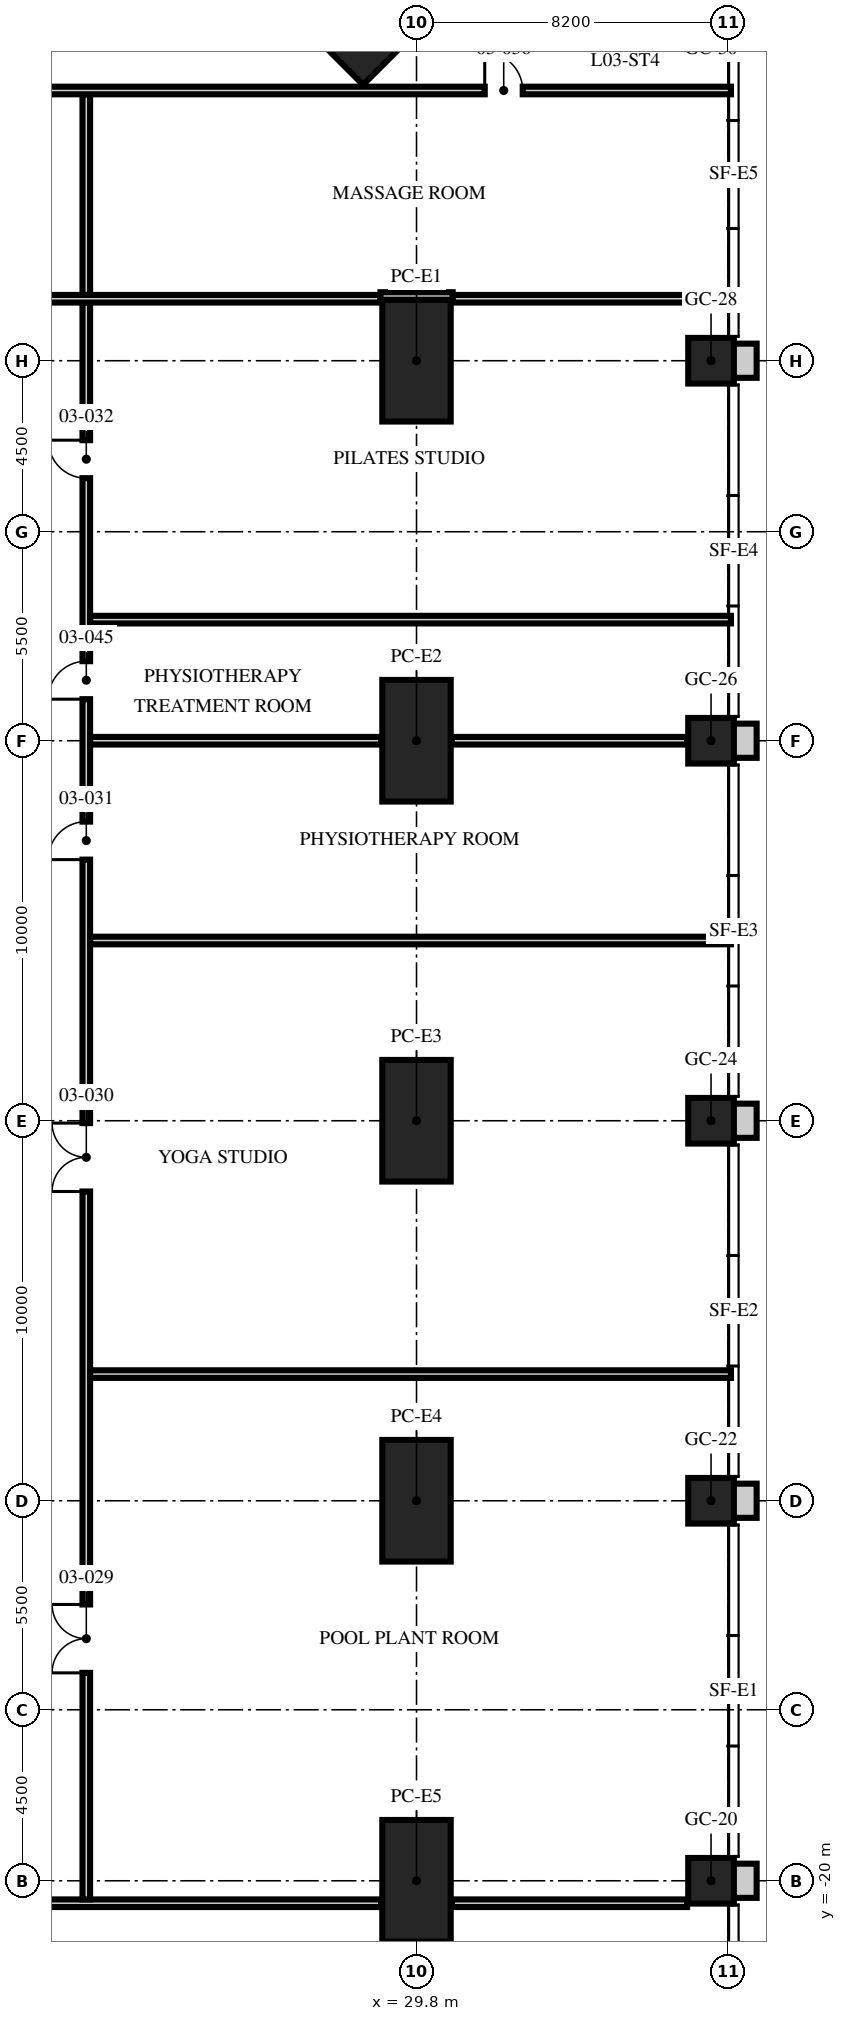
"""IFC4 building model, lengths in metres.
Left out: names, types, materials, properties, quantities, classifications, styles, units other than length and angle.
Written with IfcOpenShell. Run it as: python <this file> out.ifc"""

import sys

from ifc_helpers import new_model, si_unit, direction, frame, frame_2d, origin, origin_2d, place, context, subcontext, project, spatial, rectangle, hollow_rectangle, extrude, element, fill, save


model = new_model("IFC4")
c1 = context("Model", 3, precision=1e-05, world=origin(), true_north=direction((0.0, 1.0)))
c2 = subcontext(c1, "Body", "Model", "MODEL_VIEW")
j1 = project(units=[si_unit("LENGTHUNIT", "METRE"), si_unit("PLANEANGLEUNIT", "RADIAN")], contexts=[c1])
p1 = place(None, origin())
s1 = spatial("IfcSite", under=j1, at=p1, CompositionType="ELEMENT")
p2 = place(p1, origin())
s2 = spatial("IfcBuilding", under=s1, at=p2, CompositionType="ELEMENT")
p3 = place(p2, frame((0.0, 0.0, 16.0)))
s3 = spatial("IfcBuildingStorey", under=s2, at=p3, CompositionType="ELEMENT", Elevation=16.0)
for number, where, z_axis, x_axis in (
    (1, (29.8, 20.0, 0.0), (0.0, 0.0, 1.0), (0.0, 1.0, 0.0)),
    (2, (29.8, 10.0, 0.0), (0.0, 0.0, 1.0), (0.0, 1.0, 0.0)),
    (3, (29.8, 0.0, 0.0), (0.0, 0.0, 1.0), (0.0, 1.0, 0.0)),
    (4, (29.8, -10.0, 0.0), (0.0, 0.0, 1.0), (0.0, 1.0, 0.0)),
    (5, (29.8, -20.0, 0.0), (0.0, 0.0, 1.0), (0.0, 1.0, 0.0)),
):
    element("IfcColumn", number, at=place(p3, frame(where, z_axis=z_axis, x_axis=x_axis)), inside=s3, PredefinedType="COLUMN", context=c2, shape_type="SweptSolid", body=[
        extrude(hollow_rectangle(XDim=3.2, YDim=1.8, WallThickness=0.2, at=origin_2d()), origin(), (0.0, 0.0, 1.0), 5.0),
    ])
p4 = place(p3, frame((28.394, 28.394, 0.0), z_axis=(0.0, 0.0, 1.0), x_axis=(0.707106781187, -0.707106781187, 0.0)))
e6 = element("IfcColumn", 6, at=p4, inside=s3, PredefinedType="COLUMN", context=c2, shape_type="SweptSolid", body=[
    extrude(hollow_rectangle(XDim=1.6, YDim=1.6, WallThickness=0.1, at=origin_2d()), origin(), (0.0, 0.0, 1.0), 5.0),
])
for number, where, z_axis, x_axis in (
    (7, (37.55, -20.0, 0.0), (0.0, 0.0, 1.0), (1.0, 0.0, 0.0)),
    (8, (37.55, -10.0, 0.0), (0.0, 0.0, 1.0), (1.0, 0.0, 0.0)),
    (9, (37.55, 0.0, 0.0), (0.0, 0.0, 1.0), (1.0, 0.0, 0.0)),
    (10, (37.55, 10.0, 0.0), (0.0, 0.0, 1.0), (1.0, 0.0, 0.0)),
    (11, (37.55, 20.0, 0.0), (0.0, 0.0, 1.0), (1.0, 0.0, 0.0)),
):
    element("IfcColumn", number, at=place(p3, frame(where, z_axis=z_axis, x_axis=x_axis)), inside=s3, PredefinedType="COLUMN", context=c2, shape_type="SweptSolid", body=[
        extrude(rectangle(XDim=1.2, YDim=1.2, at=origin_2d()), origin(), (0.0, 0.0, 1.0), 5.0),
    ])
for number, where, z_axis, x_axis in (
    (12, (38.375, -20.45, 0.0), (0.0, 0.0, 1.0), (0.0, 1.0, 0.0)),
    (13, (38.375, -10.45, 0.0), (0.0, 0.0, 1.0), (0.0, 1.0, 0.0)),
    (14, (38.375, -0.45, 0.0), (0.0, 0.0, 1.0), (0.0, 1.0, 0.0)),
    (15, (38.375, 9.55, 0.0), (0.0, 0.0, 1.0), (0.0, 1.0, 0.0)),
    (16, (38.375, 19.55, 0.0), (0.0, 0.0, 1.0), (0.0, 1.0, 0.0)),
):
    element("IfcWall", number, at=place(p3, frame(where, z_axis=z_axis, x_axis=x_axis)), inside=s3, PredefinedType="SOLIDWALL", context=c2, shape_type="SweptSolid", body=[
        extrude(rectangle(XDim=0.9, YDim=0.75, at=frame_2d((0.45, 0.0))), origin(), (0.0, 0.0, 1.0), 5.0),
    ])
p5 = place(p3, frame((-28.87, -20.591, 0.0), z_axis=(0.0, 0.0, 1.0), x_axis=(1.0, 0.0, 0.0)))
e17 = element("IfcWall", 17, at=p5, inside=s3, PredefinedType="SOLIDWALL", context=c2, shape_type="SweptSolid", body=[
    extrude(rectangle(XDim=57.74, YDim=0.2, at=frame_2d((28.87, 0.0))), origin(), (0.0, 0.0, 1.0), 3.55),
])
p6 = place(p5, frame((23.748, 0.0, 0.0)))
e18 = element("IfcOpeningElement", 18, at=p6, cuts=e17, PredefinedType="OPENING", context=c2, shape_type="SweptSolid", body=[
    extrude(rectangle(XDim=1.8, YDim=2.4, at=frame_2d((0.9, 1.2))), frame((0.0, 0.11, 0.0), z_axis=(0.0, -1.0, 0.0), x_axis=(1.0, 0.0, 0.0)), (0.0, 0.0, 1.0), 0.22),
])
p7 = place(p5, frame((44.859, 0.0, 0.0)))
e19 = element("IfcOpeningElement", 19, at=p7, cuts=e17, PredefinedType="OPENING", context=c2, shape_type="SweptSolid", body=[
    extrude(rectangle(XDim=1.8, YDim=2.4, at=frame_2d((0.9, 1.2))), frame((0.0, 0.11, 0.0), z_axis=(0.0, -1.0, 0.0), x_axis=(1.0, 0.0, 0.0)), (0.0, 0.0, 1.0), 0.22),
])
p8 = place(p3, frame((30.73, -20.591, 0.0), z_axis=(0.0, 0.0, 1.0), x_axis=(1.0, 0.0, 0.0)))
e20 = element("IfcWall", 20, at=p8, inside=s3, PredefinedType="SOLIDWALL", context=c2, shape_type="SweptSolid", body=[
    extrude(rectangle(XDim=6.19, YDim=0.2, at=frame_2d((3.095, 0.0))), origin(), (0.0, 0.0, 1.0), 4.75),
])
p9 = place(p3, frame((21.111, -20.491, 0.0), z_axis=(0.0, 0.0, 1.0), x_axis=(0.0, 1.0, 0.0)))
e21 = element("IfcWall", 21, at=p9, inside=s3, PredefinedType="SOLIDWALL", context=c2, shape_type="SweptSolid", body=[
    extrude(rectangle(XDim=42.022, YDim=0.2, at=frame_2d((21.011, 0.0))), origin(), (0.0, 0.0, 1.0), 3.55),
])
p10 = place(p9, frame((5.962, 0.0, 0.0)))
e22 = element("IfcOpeningElement", 22, at=p10, cuts=e21, PredefinedType="OPENING", context=c2, shape_type="SweptSolid", body=[
    extrude(rectangle(XDim=1.8, YDim=2.4, at=frame_2d((0.9, 1.2))), frame((0.0, 0.11, 0.0), z_axis=(0.0, -1.0, 0.0), x_axis=(1.0, 0.0, 0.0)), (0.0, 0.0, 1.0), 0.22),
])
p11 = place(p9, frame((18.629, 0.0, 0.0)))
e23 = element("IfcOpeningElement", 23, at=p11, cuts=e21, PredefinedType="OPENING", context=c2, shape_type="SweptSolid", body=[
    extrude(rectangle(XDim=1.8, YDim=2.4, at=frame_2d((0.9, 1.2))), frame((0.0, 0.11, 0.0), z_axis=(0.0, -1.0, 0.0), x_axis=(1.0, 0.0, 0.0)), (0.0, 0.0, 1.0), 0.22),
])
p12 = place(p9, frame((27.363, 0.0, 0.0)))
e24 = element("IfcOpeningElement", 24, at=p12, cuts=e21, PredefinedType="OPENING", context=c2, shape_type="SweptSolid", body=[
    extrude(rectangle(XDim=1.0, YDim=2.1, at=frame_2d((0.5, 1.05))), frame((0.0, 0.11, 0.0), z_axis=(0.0, -1.0, 0.0), x_axis=(1.0, 0.0, 0.0)), (0.0, 0.0, 1.0), 0.22),
])
p13 = place(p9, frame((37.4, 0.0, 0.0)))
e25 = element("IfcOpeningElement", 25, at=p13, cuts=e21, PredefinedType="OPENING", context=c2, shape_type="SweptSolid", body=[
    extrude(rectangle(XDim=1.0, YDim=2.1, at=frame_2d((0.5, 1.05))), frame((0.0, 0.11, 0.0), z_axis=(0.0, -1.0, 0.0), x_axis=(1.0, 0.0, 0.0)), (0.0, 0.0, 1.0), 0.22),
])
p14 = place(p9, frame((31.584, 0.0, 0.0)))
e26 = element("IfcOpeningElement", 26, at=p14, cuts=e21, PredefinedType="OPENING", context=c2, shape_type="SweptSolid", body=[
    extrude(rectangle(XDim=1.0, YDim=2.1, at=frame_2d((0.5, 1.05))), frame((0.0, 0.11, 0.0), z_axis=(0.0, -1.0, 0.0), x_axis=(1.0, 0.0, 0.0)), (0.0, 0.0, 1.0), 0.22),
])
for number, where, z_axis, x_axis in (
    (27, (21.211, -6.667, 0.0), (0.0, 0.0, 1.0), (1.0, 0.0, 0.0)),
    (28, (21.211, 4.743, 0.0), (0.0, 0.0, 1.0), (1.0, 0.0, 0.0)),
):
    element("IfcWall", number, at=place(p3, frame(where, z_axis=z_axis, x_axis=x_axis)), inside=s3, PredefinedType="SOLIDWALL", context=c2, shape_type="SweptSolid", body=[
        extrude(rectangle(XDim=16.864, YDim=0.2, at=frame_2d((8.432, 0.0))), origin(), (0.0, 0.0, 1.0), 3.65),
    ])
p15 = place(p3, frame((21.211, 10.0, 0.0), z_axis=(0.0, 0.0, 1.0), x_axis=(1.0, 0.0, 0.0)))
e29 = element("IfcWall", 29, at=p15, inside=s3, PredefinedType="SOLIDWALL", context=c2, shape_type="SweptSolid", body=[
    extrude(rectangle(XDim=7.659, YDim=0.2, at=frame_2d((3.83, 0.0))), origin(), (0.0, 0.0, 1.0), 3.742),
])
p16 = place(p3, frame((30.73, 10.0, 0.0), z_axis=(0.0, 0.0, 1.0), x_axis=(1.0, 0.0, 0.0)))
e30 = element("IfcWall", 30, at=p16, inside=s3, PredefinedType="SOLIDWALL", context=c2, shape_type="SweptSolid", body=[
    extrude(rectangle(XDim=6.19, YDim=0.2, at=frame_2d((3.095, 0.0))), origin(), (0.0, 0.0, 1.0), 3.65),
])
p17 = place(p3, frame((21.211, 13.187, 0.0), z_axis=(0.0, 0.0, 1.0), x_axis=(1.0, 0.0, 0.0)))
e31 = element("IfcWall", 31, at=p17, inside=s3, PredefinedType="SOLIDWALL", context=c2, shape_type="SweptSolid", body=[
    extrude(rectangle(XDim=16.864, YDim=0.2, at=frame_2d((8.432, 0.0))), origin(), (0.0, 0.0, 1.0), 3.65),
])
p18 = place(p3, frame((1.9, 21.631, 0.0), z_axis=(0.0, 0.0, 1.0), x_axis=(1.0, 0.0, 0.0)))
e32 = element("IfcWall", 32, at=p18, inside=s3, PredefinedType="SOLIDWALL", context=c2, shape_type="SweptSolid", body=[
    extrude(rectangle(XDim=26.95, YDim=0.2, at=frame_2d((13.475, 0.0))), origin(), (0.0, 0.0, 1.0), 3.55),
])
p19 = place(p18, frame((9.166, 0.0, 0.0)))
e33 = element("IfcOpeningElement", 33, at=p19, cuts=e32, PredefinedType="OPENING", context=c2, shape_type="SweptSolid", body=[
    extrude(rectangle(XDim=1.0, YDim=2.1, at=frame_2d((0.5, 1.05))), frame((0.0, 0.11, 0.0), z_axis=(0.0, -1.0, 0.0), x_axis=(1.0, 0.0, 0.0)), (0.0, 0.0, 1.0), 0.22),
])
p20 = place(p3, frame((30.75, 21.631, 0.0), z_axis=(0.0, 0.0, 1.0), x_axis=(1.0, 0.0, 0.0)))
e34 = element("IfcWall", 34, at=p20, inside=s3, PredefinedType="SOLIDWALL", context=c2, shape_type="SweptSolid", body=[
    extrude(rectangle(XDim=7.325, YDim=0.2, at=frame_2d((3.663, 0.0))), origin(), (0.0, 0.0, 1.0), 3.65),
])
p21 = place(p3, frame((28.85, 21.702, 0.0), z_axis=(0.0, 0.0, 1.0), x_axis=(1.0, 0.0, 0.0)))
e35 = element("IfcWall", 35, at=p21, inside=s3, PredefinedType="SOLIDWALL", context=c2, shape_type="SweptSolid", body=[
    extrude(rectangle(XDim=1.9, YDim=0.2, at=frame_2d((0.95, 0.0))), origin(), (0.0, 0.0, 1.0), 3.96),
])
p22 = place(p3, frame((21.111, 21.731, 0.0), z_axis=(0.0, 0.0, 1.0), x_axis=(0.0, 1.0, 0.0)))
e36 = element("IfcWall", 36, at=p22, inside=s3, PredefinedType="SOLIDWALL", context=c2, shape_type="SweptSolid", body=[
    extrude(rectangle(XDim=5.28, YDim=0.2, at=frame_2d((2.64, 0.0))), origin(), (0.0, 0.0, 1.0), 4.75),
])
p23 = place(p3, frame((1.9, 27.111, 0.0), z_axis=(0.0, 0.0, 1.0), x_axis=(1.0, 0.0, 0.0)))
e37 = element("IfcWall", 37, at=p23, inside=s3, PredefinedType="SOLIDWALL", context=c2, shape_type="SweptSolid", body=[
    extrude(rectangle(XDim=36.175, YDim=0.2, at=frame_2d((18.087, 0.0))), origin(), (0.0, 0.0, 1.0), 3.55),
])
p24 = place(p23, frame((29.695, 0.0, 0.0)))
e38 = element("IfcOpeningElement", 38, at=p24, cuts=e37, PredefinedType="OPENING", context=c2, shape_type="SweptSolid", body=[
    extrude(rectangle(XDim=1.0, YDim=2.1, at=frame_2d((0.5, 1.05))), frame((0.0, 0.11, 0.0), z_axis=(0.0, -1.0, 0.0), x_axis=(1.0, 0.0, 0.0)), (0.0, 0.0, 1.0), 0.22),
])
p25 = place(p10, origin())
e39 = element("IfcDoor", 39, at=p25, inside=s3, OperationType="DOUBLE_DOOR_SINGLE_SWING", PredefinedType="DOOR", context=c2, shape_type="SweptSolid", body=[
    extrude(rectangle(XDim=1.8, YDim=2.4, at=frame_2d((0.9, 1.2))), frame((0.0, 0.025, 0.0), z_axis=(0.0, -1.0, 0.0), x_axis=(1.0, 0.0, 0.0)), (0.0, 0.0, 1.0), 0.05),
])
fill(e22, e39)
p26 = place(p11, origin())
e40 = element("IfcDoor", 40, at=p26, inside=s3, OperationType="DOUBLE_DOOR_SINGLE_SWING", PredefinedType="DOOR", context=c2, shape_type="SweptSolid", body=[
    extrude(rectangle(XDim=1.8, YDim=2.4, at=frame_2d((0.9, 1.2))), frame((0.0, 0.025, 0.0), z_axis=(0.0, -1.0, 0.0), x_axis=(1.0, 0.0, 0.0)), (0.0, 0.0, 1.0), 0.05),
])
fill(e23, e40)
p27 = place(p12, origin())
e41 = element("IfcDoor", 41, at=p27, inside=s3, OperationType="SINGLE_SWING_LEFT", PredefinedType="DOOR", context=c2, shape_type="SweptSolid", body=[
    extrude(rectangle(XDim=1.0, YDim=2.1, at=frame_2d((0.5, 1.05))), frame((0.0, 0.025, 0.0), z_axis=(0.0, -1.0, 0.0), x_axis=(1.0, 0.0, 0.0)), (0.0, 0.0, 1.0), 0.05),
])
fill(e24, e41)
p28 = place(p13, origin())
e42 = element("IfcDoor", 42, at=p28, inside=s3, OperationType="SINGLE_SWING_RIGHT", PredefinedType="DOOR", context=c2, shape_type="SweptSolid", body=[
    extrude(rectangle(XDim=1.0, YDim=2.1, at=frame_2d((0.5, 1.05))), frame((0.0, 0.025, 0.0), z_axis=(0.0, -1.0, 0.0), x_axis=(1.0, 0.0, 0.0)), (0.0, 0.0, 1.0), 0.05),
])
fill(e25, e42)
p29 = place(p24, origin())
e43 = element("IfcDoor", 43, at=p29, inside=s3, OperationType="SINGLE_SWING_LEFT", PredefinedType="DOOR", context=c2, shape_type="SweptSolid", body=[
    extrude(rectangle(XDim=1.0, YDim=2.1, at=frame_2d((0.5, 1.05))), frame((0.0, 0.025, 0.0), z_axis=(0.0, -1.0, 0.0), x_axis=(1.0, 0.0, 0.0)), (0.0, 0.0, 1.0), 0.05),
])
fill(e38, e43)
p30 = place(p14, origin())
e44 = element("IfcDoor", 44, at=p30, inside=s3, OperationType="SINGLE_SWING_LEFT", PredefinedType="DOOR", context=c2, shape_type="SweptSolid", body=[
    extrude(rectangle(XDim=1.0, YDim=2.1, at=frame_2d((0.5, 1.05))), frame((0.0, 0.025, 0.0), z_axis=(0.0, -1.0, 0.0), x_axis=(1.0, 0.0, 0.0)), (0.0, 0.0, 1.0), 0.05),
])
fill(e26, e44)
save(model, sys.argv[1])
